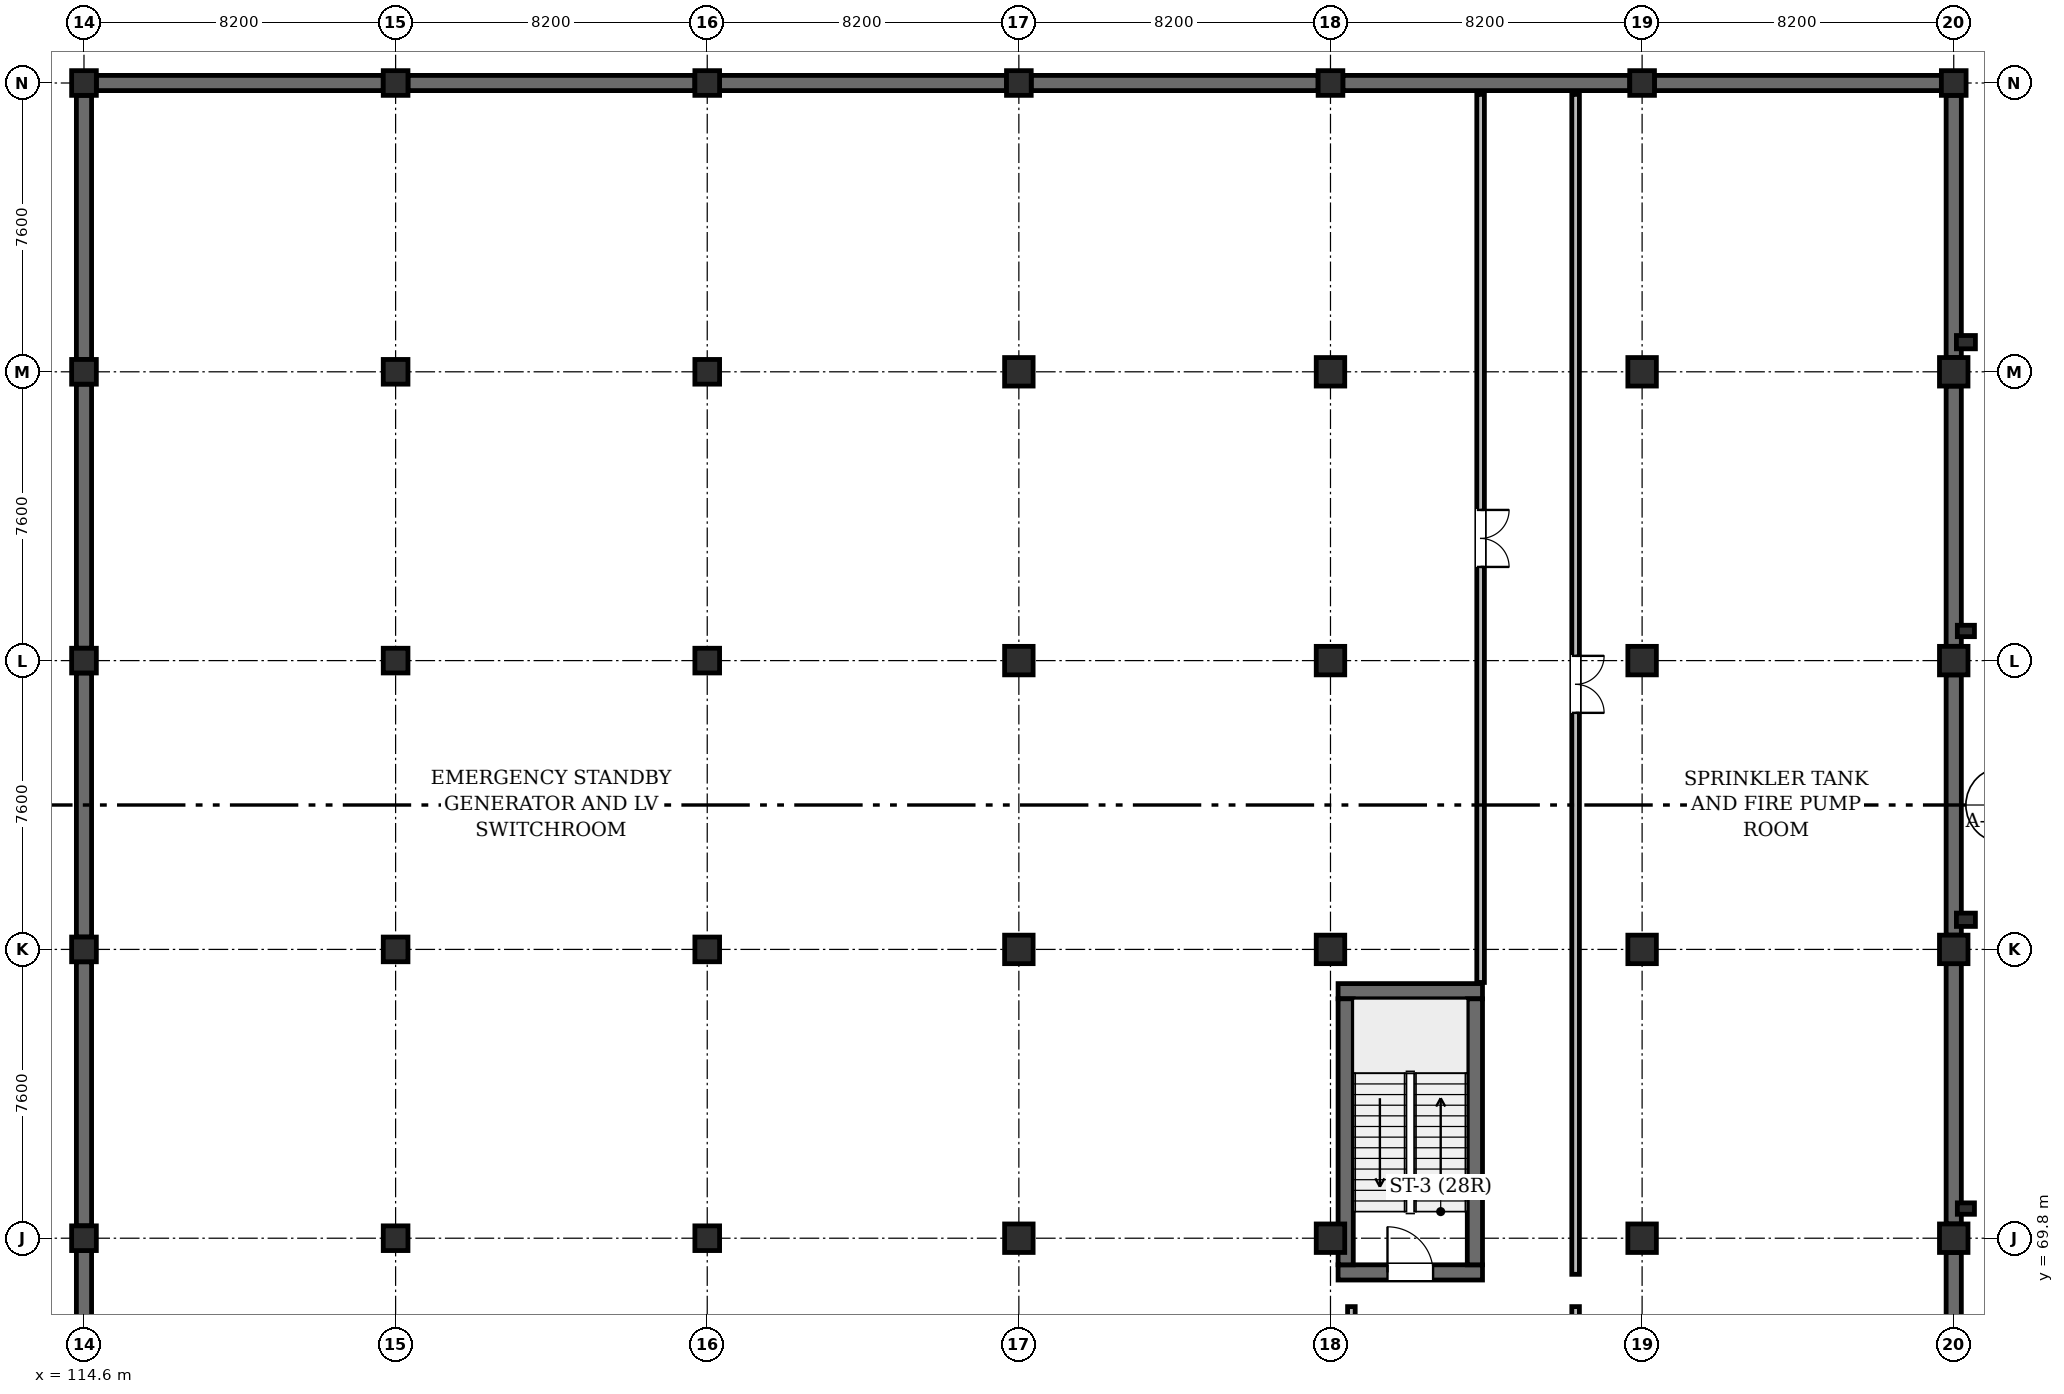
"""IFC4 building model, lengths in metres.
Left out: names, types, materials, properties, quantities, classifications, styles, units other than length and angle.
Written with IfcOpenShell. Run it as: python <this file> out.ifc"""

import sys

from ifc_helpers import new_model, si_unit, direction, frame, frame_2d, origin, origin_2d, place, context, subcontext, project, spatial, rectangle, extrude, element, fill, save


model = new_model("IFC4")
c1 = context("Model", 3, precision=1e-05, world=origin(), true_north=direction((0.0, 1.0)))
c2 = subcontext(c1, "Body", "Model", "MODEL_VIEW")
j1 = project(units=[si_unit("LENGTHUNIT", "METRE"), si_unit("PLANEANGLEUNIT", "RADIAN")], contexts=[c1])
p1 = place(None, origin())
s1 = spatial("IfcSite", under=j1, at=p1, CompositionType="ELEMENT")
p2 = place(p1, origin())
s2 = spatial("IfcBuilding", under=s1, at=p2, CompositionType="ELEMENT")
p3 = place(p2, frame((0.0, 0.0, -4.8)))
s3 = spatial("IfcBuildingStorey", under=s2, at=p3, CompositionType="ELEMENT", Elevation=-4.8)
for number, where, z_axis, x_axis in (
    (1, (114.6, 69.8, 0.0), (0.0, 0.0, 1.0), (1.0, 0.0, 0.0)),
    (2, (114.6, 77.4, 0.0), (0.0, 0.0, 1.0), (1.0, 0.0, 0.0)),
    (3, (114.6, 85.0, 0.0), (0.0, 0.0, 1.0), (1.0, 0.0, 0.0)),
    (4, (114.6, 92.6, 0.0), (0.0, 0.0, 1.0), (1.0, 0.0, 0.0)),
    (5, (114.6, 100.2, 0.0), (0.0, 0.0, 1.0), (1.0, 0.0, 0.0)),
    (6, (122.8, 69.8, 0.0), (0.0, 0.0, 1.0), (1.0, 0.0, 0.0)),
    (7, (122.8, 77.4, 0.0), (0.0, 0.0, 1.0), (1.0, 0.0, 0.0)),
    (8, (122.8, 85.0, 0.0), (0.0, 0.0, 1.0), (1.0, 0.0, 0.0)),
    (9, (122.8, 92.6, 0.0), (0.0, 0.0, 1.0), (1.0, 0.0, 0.0)),
    (10, (122.8, 100.2, 0.0), (0.0, 0.0, 1.0), (1.0, 0.0, 0.0)),
    (11, (131.0, 69.8, 0.0), (0.0, 0.0, 1.0), (1.0, 0.0, 0.0)),
    (12, (131.0, 77.4, 0.0), (0.0, 0.0, 1.0), (1.0, 0.0, 0.0)),
    (13, (131.0, 85.0, 0.0), (0.0, 0.0, 1.0), (1.0, 0.0, 0.0)),
    (14, (131.0, 92.6, 0.0), (0.0, 0.0, 1.0), (1.0, 0.0, 0.0)),
    (15, (131.0, 100.2, 0.0), (0.0, 0.0, 1.0), (1.0, 0.0, 0.0)),
):
    element("IfcColumn", number, at=place(p3, frame(where, z_axis=z_axis, x_axis=x_axis)), inside=s3, PredefinedType="COLUMN", context=c2, shape_type="SweptSolid", body=[
        extrude(rectangle(XDim=0.65, YDim=0.65, at=origin_2d()), origin(), (0.0, 0.0, 1.0), 4.46),
    ])
for number, where, z_axis, x_axis in (
    (16, (139.2, 69.8, 0.0), (0.0, 0.0, 1.0), (1.0, 0.0, 0.0)),
    (17, (139.2, 77.4, 0.0), (0.0, 0.0, 1.0), (1.0, 0.0, 0.0)),
    (18, (139.2, 85.0, 0.0), (0.0, 0.0, 1.0), (1.0, 0.0, 0.0)),
    (19, (139.2, 92.6, 0.0), (0.0, 0.0, 1.0), (1.0, 0.0, 0.0)),
):
    element("IfcColumn", number, at=place(p3, frame(where, z_axis=z_axis, x_axis=x_axis)), inside=s3, PredefinedType="COLUMN", context=c2, shape_type="SweptSolid", body=[
        extrude(rectangle(XDim=0.75, YDim=0.75, at=origin_2d()), origin(), (0.0, 0.0, 1.0), 4.46),
    ])
p4 = place(p3, frame((139.2, 100.2, 0.0), z_axis=(0.0, 0.0, 1.0), x_axis=(1.0, 0.0, 0.0)))
e20 = element("IfcColumn", 20, at=p4, inside=s3, PredefinedType="COLUMN", context=c2, shape_type="SweptSolid", body=[
    extrude(rectangle(XDim=0.65, YDim=0.65, at=origin_2d()), origin(), (0.0, 0.0, 1.0), 4.46),
])
for number, where, z_axis, x_axis in (
    (21, (147.4, 69.8, 0.0), (0.0, 0.0, 1.0), (1.0, 0.0, 0.0)),
    (22, (147.4, 77.4, 0.0), (0.0, 0.0, 1.0), (1.0, 0.0, 0.0)),
    (23, (147.4, 85.0, 0.0), (0.0, 0.0, 1.0), (1.0, 0.0, 0.0)),
    (24, (147.4, 92.6, 0.0), (0.0, 0.0, 1.0), (1.0, 0.0, 0.0)),
):
    element("IfcColumn", number, at=place(p3, frame(where, z_axis=z_axis, x_axis=x_axis)), inside=s3, PredefinedType="COLUMN", context=c2, shape_type="SweptSolid", body=[
        extrude(rectangle(XDim=0.75, YDim=0.75, at=origin_2d()), origin(), (0.0, 0.0, 1.0), 4.46),
    ])
p5 = place(p3, frame((147.4, 100.2, 0.0), z_axis=(0.0, 0.0, 1.0), x_axis=(1.0, 0.0, 0.0)))
e25 = element("IfcColumn", 25, at=p5, inside=s3, PredefinedType="COLUMN", context=c2, shape_type="SweptSolid", body=[
    extrude(rectangle(XDim=0.65, YDim=0.65, at=origin_2d()), origin(), (0.0, 0.0, 1.0), 4.46),
])
for number, where, z_axis, x_axis in (
    (26, (155.6, 69.8, 0.0), (0.0, 0.0, 1.0), (1.0, 0.0, 0.0)),
    (27, (155.6, 77.4, 0.0), (0.0, 0.0, 1.0), (1.0, 0.0, 0.0)),
    (28, (155.6, 85.0, 0.0), (0.0, 0.0, 1.0), (1.0, 0.0, 0.0)),
    (29, (155.6, 92.6, 0.0), (0.0, 0.0, 1.0), (1.0, 0.0, 0.0)),
):
    element("IfcColumn", number, at=place(p3, frame(where, z_axis=z_axis, x_axis=x_axis)), inside=s3, PredefinedType="COLUMN", context=c2, shape_type="SweptSolid", body=[
        extrude(rectangle(XDim=0.75, YDim=0.75, at=origin_2d()), origin(), (0.0, 0.0, 1.0), 4.46),
    ])
p6 = place(p3, frame((155.6, 100.2, 0.0), z_axis=(0.0, 0.0, 1.0), x_axis=(1.0, 0.0, 0.0)))
e30 = element("IfcColumn", 30, at=p6, inside=s3, PredefinedType="COLUMN", context=c2, shape_type="SweptSolid", body=[
    extrude(rectangle(XDim=0.65, YDim=0.65, at=origin_2d()), origin(), (0.0, 0.0, 1.0), 4.46),
])
for number, where, z_axis, x_axis in (
    (31, (163.8, 69.8, 0.0), (0.0, 0.0, 1.0), (1.0, 0.0, 0.0)),
    (32, (163.8, 77.4, 0.0), (0.0, 0.0, 1.0), (1.0, 0.0, 0.0)),
    (33, (163.8, 85.0, 0.0), (0.0, 0.0, 1.0), (1.0, 0.0, 0.0)),
    (34, (163.8, 92.6, 0.0), (0.0, 0.0, 1.0), (1.0, 0.0, 0.0)),
):
    element("IfcColumn", number, at=place(p3, frame(where, z_axis=z_axis, x_axis=x_axis)), inside=s3, PredefinedType="COLUMN", context=c2, shape_type="SweptSolid", body=[
        extrude(rectangle(XDim=0.75, YDim=0.75, at=origin_2d()), origin(), (0.0, 0.0, 1.0), 4.46),
    ])
p7 = place(p3, frame((163.8, 100.2, 0.0), z_axis=(0.0, 0.0, 1.0), x_axis=(1.0, 0.0, 0.0)))
e35 = element("IfcColumn", 35, at=p7, inside=s3, PredefinedType="COLUMN", context=c2, shape_type="SweptSolid", body=[
    extrude(rectangle(XDim=0.65, YDim=0.65, at=origin_2d()), origin(), (0.0, 0.0, 1.0), 4.46),
])
p8 = place(p3, frame((164.12, 70.58, 0.0), z_axis=(0.0, 0.0, 1.0), x_axis=(1.0, 0.0, 0.0)))
e36 = element("IfcColumn", 36, at=p8, inside=s3, PredefinedType="PILASTER", context=c2, shape_type="SweptSolid", body=[
    extrude(rectangle(XDim=0.45, YDim=0.3, at=origin_2d()), origin(), (0.0, 0.0, 1.0), 4.565),
])
p9 = place(p3, frame((164.12, 78.18, 0.0), z_axis=(0.0, 0.0, 1.0), x_axis=(1.0, 0.0, 0.0)))
e37 = element("IfcColumn", 37, at=p9, inside=s3, PredefinedType="PILASTER", context=c2, shape_type="SweptSolid", body=[
    extrude(rectangle(XDim=0.5, YDim=0.35, at=origin_2d()), origin(), (0.0, 0.0, 1.0), 4.565),
])
p10 = place(p3, frame((164.12, 85.78, 0.0), z_axis=(0.0, 0.0, 1.0), x_axis=(1.0, 0.0, 0.0)))
e38 = element("IfcColumn", 38, at=p10, inside=s3, PredefinedType="PILASTER", context=c2, shape_type="SweptSolid", body=[
    extrude(rectangle(XDim=0.45, YDim=0.3, at=origin_2d()), origin(), (0.0, 0.0, 1.0), 4.565),
])
p11 = place(p3, frame((164.12, 93.38, 0.0), z_axis=(0.0, 0.0, 1.0), x_axis=(1.0, 0.0, 0.0)))
e39 = element("IfcColumn", 39, at=p11, inside=s3, PredefinedType="PILASTER", context=c2, shape_type="SweptSolid", body=[
    extrude(rectangle(XDim=0.5, YDim=0.35, at=origin_2d()), origin(), (0.0, 0.0, 1.0), 4.565),
])
p12 = place(p3, frame((114.6, 62.525, 0.0), z_axis=(0.0, 0.0, 1.0), x_axis=(0.0, 1.0, 0.0)))
e40 = element("IfcWall", 40, at=p12, inside=s3, PredefinedType="SOLIDWALL", context=c2, shape_type="SweptSolid", body=[
    extrude(rectangle(XDim=6.95, YDim=0.4, at=frame_2d((3.475, 0.0))), origin(), (0.0, 0.0, 1.0), 4.46),
])
for number, where, z_axis, x_axis in (
    (41, (114.6, 70.125, 0.0), (0.0, 0.0, 1.0), (0.0, 1.0, 0.0)),
    (42, (114.6, 77.725, 0.0), (0.0, 0.0, 1.0), (0.0, 1.0, 0.0)),
    (43, (114.6, 85.325, 0.0), (0.0, 0.0, 1.0), (0.0, 1.0, 0.0)),
    (44, (114.6, 92.925, 0.0), (0.0, 0.0, 1.0), (0.0, 1.0, 0.0)),
):
    element("IfcWall", number, at=place(p3, frame(where, z_axis=z_axis, x_axis=x_axis)), inside=s3, PredefinedType="SOLIDWALL", context=c2, shape_type="SweptSolid", body=[
        extrude(rectangle(XDim=6.95, YDim=0.4, at=frame_2d((3.475, 0.0))), origin(), (0.0, 0.0, 1.0), 4.46),
    ])
for number, where, z_axis, x_axis in (
    (45, (114.925, 100.2, 0.0), (0.0, 0.0, 1.0), (1.0, 0.0, 0.0)),
    (46, (123.125, 100.2, 0.0), (0.0, 0.0, 1.0), (1.0, 0.0, 0.0)),
    (47, (131.325, 100.2, 0.0), (0.0, 0.0, 1.0), (1.0, 0.0, 0.0)),
    (48, (139.525, 100.2, 0.0), (0.0, 0.0, 1.0), (1.0, 0.0, 0.0)),
):
    element("IfcWall", number, at=place(p3, frame(where, z_axis=z_axis, x_axis=x_axis)), inside=s3, PredefinedType="SOLIDWALL", context=c2, shape_type="SweptSolid", body=[
        extrude(rectangle(XDim=7.55, YDim=0.4, at=frame_2d((3.775, 0.0))), origin(), (0.0, 0.0, 1.0), 4.46),
    ])
p13 = place(p3, frame((147.725, 100.2, 0.0), z_axis=(0.0, 0.0, 1.0), x_axis=(1.0, 0.0, 0.0)))
e49 = element("IfcWall", 49, at=p13, inside=s3, PredefinedType="SOLIDWALL", context=c2, shape_type="SweptSolid", body=[
    extrude(rectangle(XDim=7.55, YDim=0.4, at=frame_2d((3.775, 0.0))), origin(), (0.0, 0.0, 1.0), 4.46),
])
p14 = place(p3, frame((155.925, 100.2, 0.0), z_axis=(0.0, 0.0, 1.0), x_axis=(1.0, 0.0, 0.0)))
e50 = element("IfcWall", 50, at=p14, inside=s3, PredefinedType="SOLIDWALL", context=c2, shape_type="SweptSolid", body=[
    extrude(rectangle(XDim=7.55, YDim=0.4, at=frame_2d((3.775, 0.0))), origin(), (0.0, 0.0, 1.0), 4.46),
])
p15 = place(p3, frame((163.8, 62.65, 0.0), z_axis=(0.0, 0.0, 1.0), x_axis=(0.0, 1.0, 0.0)))
e51 = element("IfcWall", 51, at=p15, inside=s3, PredefinedType="SOLIDWALL", context=c2, shape_type="SweptSolid", body=[
    extrude(rectangle(XDim=6.775, YDim=0.4, at=frame_2d((3.388, 0.0))), origin(), (0.0, 0.0, 1.0), 4.46),
])
p16 = place(p3, frame((163.8, 70.175, 0.0), z_axis=(0.0, 0.0, 1.0), x_axis=(0.0, 1.0, 0.0)))
e52 = element("IfcWall", 52, at=p16, inside=s3, PredefinedType="SOLIDWALL", context=c2, shape_type="SweptSolid", body=[
    extrude(rectangle(XDim=6.85, YDim=0.4, at=frame_2d((3.425, 0.0))), origin(), (0.0, 0.0, 1.0), 4.46),
])
for number, where, z_axis, x_axis in (
    (53, (163.8, 77.775, 0.0), (0.0, 0.0, 1.0), (0.0, 1.0, 0.0)),
    (54, (163.8, 85.375, 0.0), (0.0, 0.0, 1.0), (0.0, 1.0, 0.0)),
):
    element("IfcWall", number, at=place(p3, frame(where, z_axis=z_axis, x_axis=x_axis)), inside=s3, PredefinedType="SOLIDWALL", context=c2, shape_type="SweptSolid", body=[
        extrude(rectangle(XDim=6.85, YDim=0.4, at=frame_2d((3.425, 0.0))), origin(), (0.0, 0.0, 1.0), 4.46),
    ])
p17 = place(p3, frame((163.8, 92.975, 0.0), z_axis=(0.0, 0.0, 1.0), x_axis=(0.0, 1.0, 0.0)))
e55 = element("IfcWall", 55, at=p17, inside=s3, PredefinedType="SOLIDWALL", context=c2, shape_type="SweptSolid", body=[
    extrude(rectangle(XDim=6.9, YDim=0.4, at=frame_2d((3.45, 0.0))), origin(), (0.0, 0.0, 1.0), 4.46),
])
p18 = place(p3, frame((147.6, 68.9, 0.0), z_axis=(0.0, 0.0, 1.0), x_axis=(1.0, 0.0, 0.0)))
e56 = element("IfcWall", 56, at=p18, inside=s3, PredefinedType="SHEAR", context=c2, shape_type="SweptSolid", body=[
    extrude(rectangle(XDim=3.8, YDim=0.4, at=frame_2d((1.9, 0.0))), origin(), (0.0, 0.0, 1.0), 4.46),
])
p19 = place(p18, frame((1.3, 0.0, 0.0)))
e57 = element("IfcOpeningElement", 57, at=p19, cuts=e56, PredefinedType="OPENING", context=c2, shape_type="SweptSolid", body=[
    extrude(rectangle(XDim=1.2, YDim=2.2, at=frame_2d((0.6, 1.1))), frame((0.0, 0.212, 0.0), z_axis=(0.0, -1.0, 0.0), x_axis=(1.0, 0.0, 0.0)), (0.0, 0.0, 1.0), 0.424),
])
p20 = place(p3, frame((147.6, 76.3, 0.0), z_axis=(0.0, 0.0, 1.0), x_axis=(1.0, 0.0, 0.0)))
e58 = element("IfcWall", 58, at=p20, inside=s3, PredefinedType="SHEAR", context=c2, shape_type="SweptSolid", body=[
    extrude(rectangle(XDim=3.8, YDim=0.4, at=frame_2d((1.9, 0.0))), origin(), (0.0, 0.0, 1.0), 4.46),
])
for number, where, z_axis, x_axis in (
    (59, (147.8, 69.1, 0.0), (0.0, 0.0, 1.0), (0.0, 1.0, 0.0)),
    (60, (151.2, 69.1, 0.0), (0.0, 0.0, 1.0), (0.0, 1.0, 0.0)),
):
    element("IfcWall", number, at=place(p3, frame(where, z_axis=z_axis, x_axis=x_axis)), inside=s3, PredefinedType="SHEAR", context=c2, shape_type="SweptSolid", body=[
        extrude(rectangle(XDim=7.0, YDim=0.4, at=frame_2d((3.5, 0.0))), origin(), (0.0, 0.0, 1.0), 4.46),
    ])
p21 = place(p3, frame((153.85, 68.0, 0.0), z_axis=(0.0, 0.0, 1.0), x_axis=(0.0, -1.0, 0.0)))
e61 = element("IfcWall", 61, at=p21, inside=s3, PredefinedType="PARTITIONING", context=c2, shape_type="SweptSolid", body=[
    extrude(rectangle(XDim=1.5, YDim=0.2, at=frame_2d((0.75, 0.0))), origin(), (0.0, 0.0, 1.0), 4.405),
])
p22 = place(p3, frame((151.35, 76.53, 0.0), z_axis=(0.0, 0.0, 1.0), x_axis=(0.0, 1.0, 0.0)))
e62 = element("IfcWall", 62, at=p22, inside=s3, PredefinedType="PARTITIONING", context=c2, shape_type="SweptSolid", body=[
    extrude(rectangle(XDim=23.37, YDim=0.2, at=frame_2d((11.685, 0.0))), origin(), (0.0, 0.0, 1.0), 4.405),
])
p23 = place(p22, frame((10.935, 0.0, 0.0)))
e63 = element("IfcOpeningElement", 63, at=p23, cuts=e62, PredefinedType="OPENING", context=c2, shape_type="SweptSolid", body=[
    extrude(rectangle(XDim=1.5, YDim=2.2, at=frame_2d((0.75, 1.1))), frame((0.0, 0.112, 0.0), z_axis=(0.0, -1.0, 0.0), x_axis=(1.0, 0.0, 0.0)), (0.0, 0.0, 1.0), 0.224),
])
p24 = place(p3, frame((153.85, 99.9, 0.0), z_axis=(0.0, 0.0, 1.0), x_axis=(0.0, -1.0, 0.0)))
e64 = element("IfcWall", 64, at=p24, inside=s3, PredefinedType="PARTITIONING", context=c2, shape_type="SweptSolid", body=[
    extrude(rectangle(XDim=31.05, YDim=0.2, at=frame_2d((15.525, 0.0))), origin(), (0.0, 0.0, 1.0), 4.405),
])
p25 = place(p24, frame((14.775, 0.0, 0.0)))
e65 = element("IfcOpeningElement", 65, at=p25, cuts=e64, PredefinedType="OPENING", context=c2, shape_type="SweptSolid", body=[
    extrude(rectangle(XDim=1.5, YDim=2.2, at=frame_2d((0.75, 1.1))), frame((0.0, 0.112, 0.0), z_axis=(0.0, -1.0, 0.0), x_axis=(1.0, 0.0, 0.0)), (0.0, 0.0, 1.0), 0.224),
])
p26 = place(p3, frame((147.95, 66.5, 0.0), z_axis=(0.0, 0.0, 1.0), x_axis=(0.0, 1.0, 0.0)))
e66 = element("IfcWall", 66, at=p26, inside=s3, PredefinedType="PARTITIONING", context=c2, shape_type="SweptSolid", body=[
    extrude(rectangle(XDim=1.5, YDim=0.2, at=frame_2d((0.75, 0.0))), origin(), (0.0, 0.0, 1.0), 4.405),
])
p27 = place(p19, origin())
e67 = element("IfcDoor", 67, at=p27, inside=s3, OperationType="SINGLE_SWING_LEFT", PredefinedType="DOOR", context=c2, shape_type="SweptSolid", body=[
    extrude(rectangle(XDim=1.2, YDim=2.2, at=frame_2d((0.6, 1.1))), frame((0.0, 0.025, 0.0), z_axis=(0.0, -1.0, 0.0), x_axis=(1.0, 0.0, 0.0)), (0.0, 0.0, 1.0), 0.05),
])
fill(e57, e67)
p28 = place(p23, frame((1.5, 0.0, 0.0), z_axis=(0.0, 0.0, 1.0), x_axis=(-1.0, 0.0, 0.0)))
e68 = element("IfcDoor", 68, at=p28, inside=s3, OperationType="DOUBLE_DOOR_SINGLE_SWING", PredefinedType="DOOR", context=c2, shape_type="SweptSolid", body=[
    extrude(rectangle(XDim=1.5, YDim=2.2, at=frame_2d((0.75, 1.1))), frame((0.0, 0.025, 0.0), z_axis=(0.0, -1.0, 0.0), x_axis=(1.0, 0.0, 0.0)), (0.0, 0.0, 1.0), 0.05),
])
fill(e63, e68)
p29 = place(p25, origin())
e69 = element("IfcDoor", 69, at=p29, inside=s3, OperationType="DOUBLE_DOOR_SINGLE_SWING", PredefinedType="DOOR", context=c2, shape_type="SweptSolid", body=[
    extrude(rectangle(XDim=1.5, YDim=2.2, at=frame_2d((0.75, 1.1))), frame((0.0, 0.025, 0.0), z_axis=(0.0, -1.0, 0.0), x_axis=(1.0, 0.0, 0.0)), (0.0, 0.0, 1.0), 0.05),
])
fill(e65, e69)
save(model, sys.argv[1])
